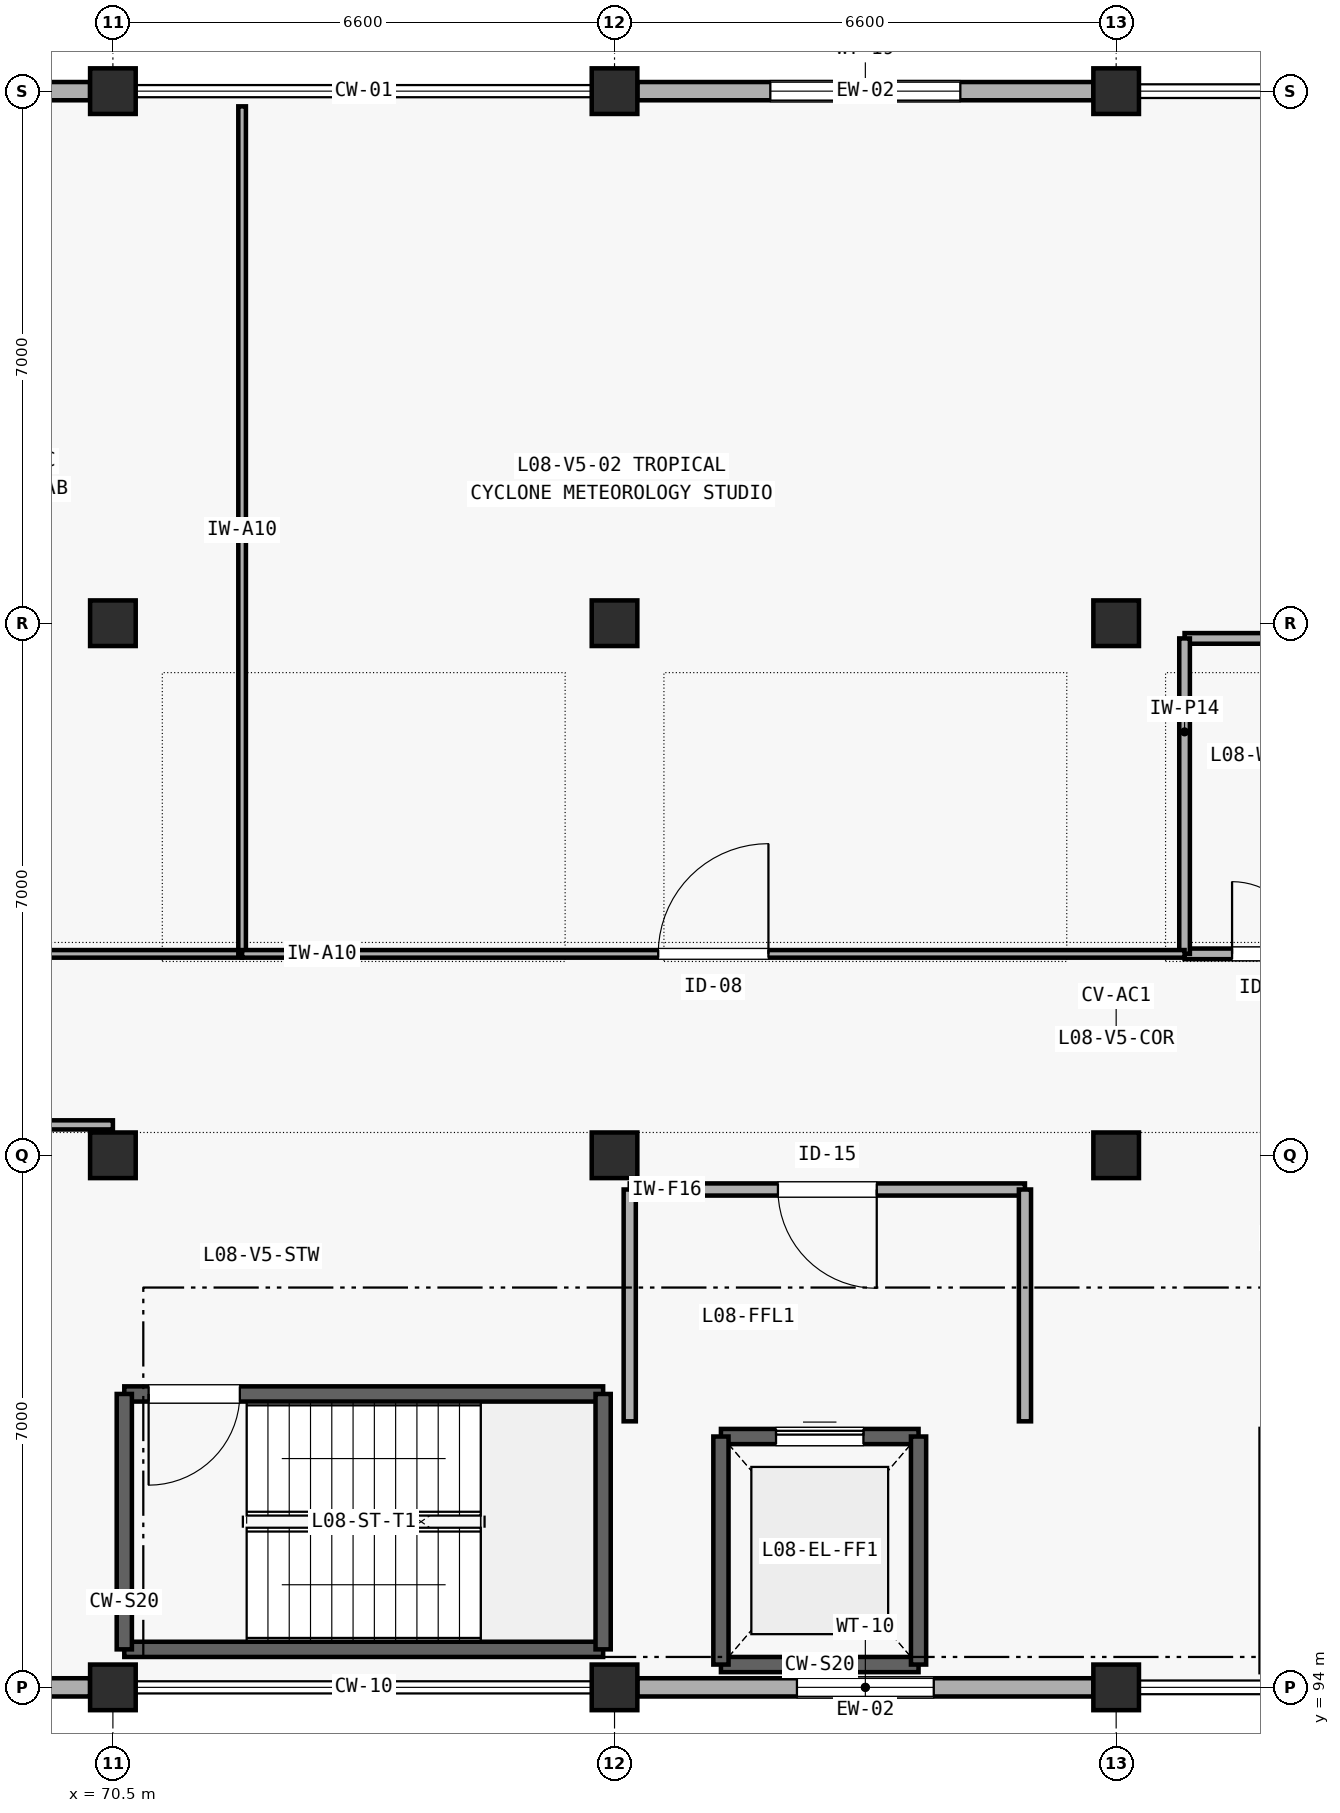
"""IFC4 building model, lengths in metres.
Left out: names, types, materials, properties, quantities, classifications, styles, units other than length and angle.
Written with IfcOpenShell. Run it as: python <this file> out.ifc"""

import sys

from ifc_helpers import new_model, si_unit, direction, frame, frame_2d, origin, origin_2d, place, context, subcontext, project, spatial, rectangle, extrude, element, fill, save


model = new_model("IFC4")
c1 = context("Model", 3, precision=1e-05, world=origin(), true_north=direction((0.0, 1.0)))
c2 = subcontext(c1, "Body", "Model", "MODEL_VIEW")
j1 = project(units=[si_unit("LENGTHUNIT", "METRE"), si_unit("PLANEANGLEUNIT", "RADIAN")], contexts=[c1])
p1 = place(None, origin())
s1 = spatial("IfcSite", under=j1, at=p1, CompositionType="ELEMENT")
p2 = place(p1, origin())
s2 = spatial("IfcBuilding", under=s1, at=p2, CompositionType="ELEMENT")
p3 = place(p2, frame((0.0, 0.0, 33.6)))
s3 = spatial("IfcBuildingStorey", under=s2, at=p3, CompositionType="ELEMENT", Elevation=33.6)
for number, where, z_axis, x_axis in (
    (1, (70.5, 94.0, 0.0), (0.0, 0.0, 1.0), (1.0, 0.0, 0.0)),
    (2, (70.5, 101.0, 0.0), (0.0, 0.0, 1.0), (1.0, 0.0, 0.0)),
    (3, (70.5, 108.0, 0.0), (0.0, 0.0, 1.0), (1.0, 0.0, 0.0)),
    (4, (70.5, 115.0, 0.0), (0.0, 0.0, 1.0), (1.0, 0.0, 0.0)),
    (5, (77.1, 94.0, 0.0), (0.0, 0.0, 1.0), (1.0, 0.0, 0.0)),
    (6, (77.1, 101.0, 0.0), (0.0, 0.0, 1.0), (1.0, 0.0, 0.0)),
    (7, (77.1, 108.0, 0.0), (0.0, 0.0, 1.0), (1.0, 0.0, 0.0)),
    (8, (77.1, 115.0, 0.0), (0.0, 0.0, 1.0), (1.0, 0.0, 0.0)),
    (9, (83.7, 94.0, 0.0), (0.0, 0.0, 1.0), (1.0, 0.0, 0.0)),
    (10, (83.7, 101.0, 0.0), (0.0, 0.0, 1.0), (1.0, 0.0, 0.0)),
    (11, (83.7, 108.0, 0.0), (0.0, 0.0, 1.0), (1.0, 0.0, 0.0)),
    (12, (83.7, 115.0, 0.0), (0.0, 0.0, 1.0), (1.0, 0.0, 0.0)),
):
    element("IfcColumn", number, at=place(p3, frame(where, z_axis=z_axis, x_axis=x_axis)), inside=s3, PredefinedType="COLUMN", context=c2, shape_type="SweptSolid", body=[
        extrude(rectangle(XDim=0.6, YDim=0.6, at=origin_2d()), origin(), (0.0, 0.0, 1.0), 4.2),
    ])
p4 = place(p3, frame((64.2, 94.0, 0.0), z_axis=(0.0, 0.0, 1.0), x_axis=(1.0, 0.0, 0.0)))
e13 = element("IfcWall", 13, at=p4, inside=s3, PredefinedType="SOLIDWALL", context=c2, shape_type="SweptSolid", body=[
    extrude(rectangle(XDim=6.0, YDim=0.24, at=frame_2d((3.0, 0.0))), origin(), (0.0, 0.0, 1.0), 3.235),
])
p5 = place(p4, frame((1.8, 0.0, 0.85)))
e14 = element("IfcOpeningElement", 14, at=p5, cuts=e13, PredefinedType="OPENING", context=c2, shape_type="SweptSolid", body=[
    extrude(rectangle(XDim=2.4, YDim=1.35, at=frame_2d((1.2, 0.675))), frame((0.0, 0.13, 0.0), z_axis=(0.0, -1.0, 0.0), x_axis=(1.0, 0.0, 0.0)), (0.0, 0.0, 1.0), 0.26),
])
p6 = place(p3, frame((77.4, 94.0, 0.0), z_axis=(0.0, 0.0, 1.0), x_axis=(1.0, 0.0, 0.0)))
e15 = element("IfcWall", 15, at=p6, inside=s3, PredefinedType="SOLIDWALL", context=c2, shape_type="SweptSolid", body=[
    extrude(rectangle(XDim=6.0, YDim=0.24, at=frame_2d((3.0, 0.0))), origin(), (0.0, 0.0, 1.0), 3.285),
])
p7 = place(p6, frame((2.1, 0.0, 0.85)))
e16 = element("IfcOpeningElement", 16, at=p7, cuts=e15, PredefinedType="OPENING", context=c2, shape_type="SweptSolid", body=[
    extrude(rectangle(XDim=1.8, YDim=1.5, at=frame_2d((0.9, 0.75))), frame((0.0, 0.13, 0.0), z_axis=(0.0, -1.0, 0.0), x_axis=(1.0, 0.0, 0.0)), (0.0, 0.0, 1.0), 0.26),
])
p8 = place(p3, frame((64.2, 115.0, 0.0), z_axis=(0.0, 0.0, 1.0), x_axis=(1.0, 0.0, 0.0)))
e17 = element("IfcWall", 17, at=p8, inside=s3, PredefinedType="SOLIDWALL", context=c2, shape_type="SweptSolid", body=[
    extrude(rectangle(XDim=6.0, YDim=0.24, at=frame_2d((3.0, 0.0))), origin(), (0.0, 0.0, 1.0), 3.235),
])
p9 = place(p8, frame((2.2, 0.0, 0.85)))
e18 = element("IfcOpeningElement", 18, at=p9, cuts=e17, PredefinedType="OPENING", context=c2, shape_type="SweptSolid", body=[
    extrude(rectangle(XDim=1.6, YDim=1.25, at=frame_2d((0.8, 0.625))), frame((0.0, 0.13, 0.0), z_axis=(0.0, -1.0, 0.0), x_axis=(1.0, 0.0, 0.0)), (0.0, 0.0, 1.0), 0.26),
])
p10 = place(p3, frame((77.4, 115.0, 0.0), z_axis=(0.0, 0.0, 1.0), x_axis=(1.0, 0.0, 0.0)))
e19 = element("IfcWall", 19, at=p10, inside=s3, PredefinedType="SOLIDWALL", context=c2, shape_type="SweptSolid", body=[
    extrude(rectangle(XDim=6.0, YDim=0.24, at=frame_2d((3.0, 0.0))), origin(), (0.0, 0.0, 1.0), 3.285),
])
p11 = place(p10, frame((1.75, 0.0, 0.85)))
e20 = element("IfcOpeningElement", 20, at=p11, cuts=e19, PredefinedType="OPENING", context=c2, shape_type="SweptSolid", body=[
    extrude(rectangle(XDim=2.5, YDim=1.25, at=frame_2d((1.25, 0.625))), frame((0.0, 0.13, 0.0), z_axis=(0.0, -1.0, 0.0), x_axis=(1.0, 0.0, 0.0)), (0.0, 0.0, 1.0), 0.26),
])
p12 = place(p3, frame((70.65, 94.5, 0.0), z_axis=(0.0, 0.0, 1.0), x_axis=(1.0, 0.0, 0.0)))
e21 = element("IfcWall", 21, at=p12, inside=s3, PredefinedType="SHEAR", context=c2, shape_type="SweptSolid", body=[
    extrude(rectangle(XDim=6.3, YDim=0.2, at=frame_2d((3.15, 0.0))), origin(), (0.0, 0.0, 1.0), 4.2),
])
p13 = place(p3, frame((70.65, 97.86, 0.0), z_axis=(0.0, 0.0, 1.0), x_axis=(1.0, 0.0, 0.0)))
e22 = element("IfcWall", 22, at=p13, inside=s3, PredefinedType="SHEAR", context=c2, shape_type="SweptSolid", body=[
    extrude(rectangle(XDim=6.3, YDim=0.2, at=frame_2d((3.15, 0.0))), origin(), (0.0, 0.0, 1.0), 4.2),
])
p14 = place(p13, frame((0.32, 0.0, 0.0)))
e23 = element("IfcOpeningElement", 23, at=p14, cuts=e22, PredefinedType="OPENING", context=c2, shape_type="SweptSolid", body=[
    extrude(rectangle(XDim=1.2, YDim=2.15, at=frame_2d((0.6, 1.075))), frame((0.0, 0.11, 0.0), z_axis=(0.0, -1.0, 0.0), x_axis=(1.0, 0.0, 0.0)), (0.0, 0.0, 1.0), 0.22),
])
for number, where, z_axis, x_axis in (
    (24, (70.65, 94.5, 0.0), (0.0, 0.0, 1.0), (0.0, 1.0, 0.0)),
    (25, (76.95, 94.5, 0.0), (0.0, 0.0, 1.0), (0.0, 1.0, 0.0)),
):
    element("IfcWall", number, at=place(p3, frame(where, z_axis=z_axis, x_axis=x_axis)), inside=s3, PredefinedType="SHEAR", context=c2, shape_type="SweptSolid", body=[
        extrude(rectangle(XDim=3.36, YDim=0.2, at=frame_2d((1.68, 0.0))), origin(), (0.0, 0.0, 1.0), 4.2),
    ])
p15 = place(p3, frame((78.5, 94.3, 0.0), z_axis=(0.0, 0.0, 1.0), x_axis=(1.0, 0.0, 0.0)))
e26 = element("IfcWall", 26, at=p15, inside=s3, PredefinedType="SHEAR", context=c2, shape_type="SweptSolid", body=[
    extrude(rectangle(XDim=2.6, YDim=0.2, at=frame_2d((1.3, 0.0))), origin(), (0.0, 0.0, 1.0), 4.2),
])
p16 = place(p3, frame((78.5, 97.3, 0.0), z_axis=(0.0, 0.0, 1.0), x_axis=(1.0, 0.0, 0.0)))
e27 = element("IfcWall", 27, at=p16, inside=s3, PredefinedType="SHEAR", context=c2, shape_type="SweptSolid", body=[
    extrude(rectangle(XDim=2.6, YDim=0.2, at=frame_2d((1.3, 0.0))), origin(), (0.0, 0.0, 1.0), 4.2),
])
p17 = place(p16, frame((0.725, 0.0, 0.0)))
e28 = element("IfcOpeningElement", 28, at=p17, cuts=e27, PredefinedType="OPENING", context=c2, shape_type="SweptSolid", body=[
    extrude(rectangle(XDim=1.15, YDim=2.2, at=frame_2d((0.575, 1.1))), frame((0.0, 0.11, 0.0), z_axis=(0.0, -1.0, 0.0), x_axis=(1.0, 0.0, 0.0)), (0.0, 0.0, 1.0), 0.22),
])
for number, where, z_axis, x_axis in (
    (29, (78.5, 94.3, 0.0), (0.0, 0.0, 1.0), (0.0, 1.0, 0.0)),
    (30, (81.1, 94.3, 0.0), (0.0, 0.0, 1.0), (0.0, 1.0, 0.0)),
):
    element("IfcWall", number, at=place(p3, frame(where, z_axis=z_axis, x_axis=x_axis)), inside=s3, PredefinedType="SHEAR", context=c2, shape_type="SweptSolid", body=[
        extrude(rectangle(XDim=3.0, YDim=0.2, at=frame_2d((1.5, 0.0))), origin(), (0.0, 0.0, 1.0), 4.2),
    ])
p18 = place(p3, frame((85.7, 94.2, 0.0), z_axis=(0.0, 0.0, 1.0), x_axis=(0.0, 1.0, 0.0)))
e31 = element("IfcWall", 31, at=p18, inside=s3, PredefinedType="SHEAR", context=c2, shape_type="SweptSolid", body=[
    extrude(rectangle(XDim=3.2, YDim=0.2, at=frame_2d((1.6, 0.0))), origin(), (0.0, 0.0, 1.0), 4.2),
])
p19 = place(p3, frame((77.3, 100.55, 0.0), z_axis=(0.0, 0.0, 1.0), x_axis=(1.0, 0.0, 0.0)))
e32 = element("IfcWall", 32, at=p19, inside=s3, PredefinedType="SOLIDWALL", context=c2, shape_type="SweptSolid", body=[
    extrude(rectangle(XDim=5.2, YDim=0.16, at=frame_2d((2.6, 0.0))), origin(), (0.0, 0.0, 1.0), 3.9),
])
p20 = place(p19, frame((1.95, 0.0, 0.0)))
e33 = element("IfcOpeningElement", 33, at=p20, cuts=e32, PredefinedType="OPENING", context=c2, shape_type="SweptSolid", body=[
    extrude(rectangle(XDim=1.3, YDim=2.15, at=frame_2d((0.65, 1.075))), frame((0.0, 0.09, 0.0), z_axis=(0.0, -1.0, 0.0), x_axis=(1.0, 0.0, 0.0)), (0.0, 0.0, 1.0), 0.18),
])
p21 = place(p3, frame((77.3, 97.5, 0.0), z_axis=(0.0, 0.0, 1.0), x_axis=(0.0, 1.0, 0.0)))
e34 = element("IfcWall", 34, at=p21, inside=s3, PredefinedType="SOLIDWALL", context=c2, shape_type="SweptSolid", body=[
    extrude(rectangle(XDim=3.05, YDim=0.16, at=frame_2d((1.525, 0.0))), origin(), (0.0, 0.0, 1.0), 3.405),
])
p22 = place(p3, frame((82.5, 97.5, 0.0), z_axis=(0.0, 0.0, 1.0), x_axis=(0.0, 1.0, 0.0)))
e35 = element("IfcWall", 35, at=p22, inside=s3, PredefinedType="SOLIDWALL", context=c2, shape_type="SweptSolid", body=[
    extrude(rectangle(XDim=3.05, YDim=0.16, at=frame_2d((1.525, 0.0))), origin(), (0.0, 0.0, 1.0), 3.9),
])
p23 = place(p3, frame((84.6, 103.65, 0.0), z_axis=(0.0, 0.0, 1.0), x_axis=(1.0, 0.0, 0.0)))
e36 = element("IfcWall", 36, at=p23, inside=s3, PredefinedType="PLUMBINGWALL", context=c2, shape_type="SweptSolid", body=[
    extrude(rectangle(XDim=2.2, YDim=0.14, at=frame_2d((1.1, 0.0))), origin(), (0.0, 0.0, 1.0), 3.9),
])
p24 = place(p23, frame((0.625, 0.0, 0.0)))
e37 = element("IfcOpeningElement", 37, at=p24, cuts=e36, PredefinedType="OPENING", context=c2, shape_type="SweptSolid", body=[
    extrude(rectangle(XDim=0.95, YDim=2.1, at=frame_2d((0.475, 1.05))), frame((0.0, 0.08, 0.0), z_axis=(0.0, -1.0, 0.0), x_axis=(1.0, 0.0, 0.0)), (0.0, 0.0, 1.0), 0.16),
])
p25 = place(p3, frame((84.6, 107.8, 0.0), z_axis=(0.0, 0.0, 1.0), x_axis=(1.0, 0.0, 0.0)))
e38 = element("IfcWall", 38, at=p25, inside=s3, PredefinedType="PLUMBINGWALL", context=c2, shape_type="SweptSolid", body=[
    extrude(rectangle(XDim=2.2, YDim=0.14, at=frame_2d((1.1, 0.0))), origin(), (0.0, 0.0, 1.0), 3.365),
])
p26 = place(p3, frame((84.6, 103.65, 0.0), z_axis=(0.0, 0.0, 1.0), x_axis=(0.0, 1.0, 0.0)))
e39 = element("IfcWall", 39, at=p26, inside=s3, PredefinedType="PLUMBINGWALL", context=c2, shape_type="SweptSolid", body=[
    extrude(rectangle(XDim=4.15, YDim=0.14, at=frame_2d((2.075, 0.0))), origin(), (0.0, 0.0, 1.0), 3.9),
])
p27 = place(p3, frame((64.1, 103.65, 0.0), z_axis=(0.0, 0.0, 1.0), x_axis=(1.0, 0.0, 0.0)))
e40 = element("IfcWall", 40, at=p27, inside=s3, PredefinedType="PARTITIONING", context=c2, shape_type="SweptSolid", body=[
    extrude(rectangle(XDim=8.1, YDim=0.1, at=frame_2d((4.05, 0.0))), origin(), (0.0, 0.0, 1.0), 3.9),
])
p28 = place(p27, frame((3.375, 0.0, 0.0)))
e41 = element("IfcOpeningElement", 41, at=p28, cuts=e40, PredefinedType="OPENING", context=c2, shape_type="SweptSolid", body=[
    extrude(rectangle(XDim=1.35, YDim=2.2, at=frame_2d((0.675, 1.1))), frame((0.0, 0.06, 0.0), z_axis=(0.0, -1.0, 0.0), x_axis=(1.0, 0.0, 0.0)), (0.0, 0.0, 1.0), 0.12),
])
p29 = place(p3, frame((72.2, 103.65, 0.0), z_axis=(0.0, 0.0, 1.0), x_axis=(0.0, 1.0, 0.0)))
e42 = element("IfcWall", 42, at=p29, inside=s3, PredefinedType="PARTITIONING", context=c2, shape_type="SweptSolid", body=[
    extrude(rectangle(XDim=11.15, YDim=0.1, at=frame_2d((5.575, 0.0))), origin(), (0.0, 0.0, 1.0), 3.9),
])
p30 = place(p3, frame((72.2, 103.65, 0.0), z_axis=(0.0, 0.0, 1.0), x_axis=(1.0, 0.0, 0.0)))
e43 = element("IfcWall", 43, at=p30, inside=s3, PredefinedType="PARTITIONING", context=c2, shape_type="SweptSolid", body=[
    extrude(rectangle(XDim=12.4, YDim=0.1, at=frame_2d((6.2, 0.0))), origin(), (0.0, 0.0, 1.0), 3.9),
])
p31 = place(p30, frame((5.475, 0.0, 0.0)))
e44 = element("IfcOpeningElement", 44, at=p31, cuts=e43, PredefinedType="OPENING", context=c2, shape_type="SweptSolid", body=[
    extrude(rectangle(XDim=1.45, YDim=2.2, at=frame_2d((0.725, 1.1))), frame((0.0, 0.06, 0.0), z_axis=(0.0, -1.0, 0.0), x_axis=(1.0, 0.0, 0.0)), (0.0, 0.0, 1.0), 0.12),
])
p32 = place(p3, frame((64.1, 101.4, 0.0), z_axis=(0.0, 0.0, 1.0), x_axis=(1.0, 0.0, 0.0)))
e45 = element("IfcWall", 45, at=p32, inside=s3, PredefinedType="PARTITIONING", context=c2, shape_type="SweptSolid", body=[
    extrude(rectangle(XDim=6.4, YDim=0.12, at=frame_2d((3.2, 0.0))), origin(), (0.0, 0.0, 1.0), 3.9),
])
p33 = place(p32, frame((2.325, 0.0, 0.0)))
e46 = element("IfcOpeningElement", 46, at=p33, cuts=e45, PredefinedType="OPENING", context=c2, shape_type="SweptSolid", body=[
    extrude(rectangle(XDim=1.75, YDim=2.25, at=frame_2d((0.875, 1.125))), frame((0.0, 0.07, 0.0), z_axis=(0.0, -1.0, 0.0), x_axis=(1.0, 0.0, 0.0)), (0.0, 0.0, 1.0), 0.14),
])
p34 = place(p7, origin())
e47 = element("IfcWindow", 47, at=p34, inside=s3, PartitioningType="SINGLE_PANEL", PredefinedType="WINDOW", context=c2, shape_type="SweptSolid", body=[
    extrude(rectangle(XDim=1.8, YDim=1.5, at=frame_2d((0.9, 0.75))), frame((0.0, 0.03, 0.0), z_axis=(0.0, -1.0, 0.0), x_axis=(1.0, 0.0, 0.0)), (0.0, 0.0, 1.0), 0.06),
])
fill(e16, e47)
p35 = place(p11, origin())
e48 = element("IfcWindow", 48, at=p35, inside=s3, PartitioningType="SINGLE_PANEL", PredefinedType="WINDOW", context=c2, shape_type="SweptSolid", body=[
    extrude(rectangle(XDim=2.5, YDim=1.25, at=frame_2d((1.25, 0.625))), frame((0.0, 0.03, 0.0), z_axis=(0.0, -1.0, 0.0), x_axis=(1.0, 0.0, 0.0)), (0.0, 0.0, 1.0), 0.06),
])
fill(e20, e48)
p36 = place(p14, frame((1.2, 0.0, 0.0), z_axis=(0.0, 0.0, 1.0), x_axis=(-1.0, 0.0, 0.0)))
e49 = element("IfcDoor", 49, at=p36, inside=s3, OperationType="SINGLE_SWING_RIGHT", PredefinedType="DOOR", context=c2, shape_type="SweptSolid", body=[
    extrude(rectangle(XDim=1.2, YDim=2.15, at=frame_2d((0.6, 1.075))), frame((0.0, 0.025, 0.0), z_axis=(0.0, -1.0, 0.0), x_axis=(1.0, 0.0, 0.0)), (0.0, 0.0, 1.0), 0.05),
])
fill(e23, e49)
p37 = place(p17, origin())
e50 = element("IfcDoor", 50, at=p37, inside=s3, OperationType="SLIDING_TO_LEFT", PredefinedType="DOOR", context=c2, shape_type="SweptSolid", body=[
    extrude(rectangle(XDim=1.15, YDim=2.2, at=frame_2d((0.575, 1.1))), frame((0.0, 0.025, 0.0), z_axis=(0.0, -1.0, 0.0), x_axis=(1.0, 0.0, 0.0)), (0.0, 0.0, 1.0), 0.05),
])
fill(e28, e50)
p38 = place(p20, frame((1.3, 0.0, 0.0), z_axis=(0.0, 0.0, 1.0), x_axis=(-1.0, 0.0, 0.0)))
e51 = element("IfcDoor", 51, at=p38, inside=s3, OperationType="SINGLE_SWING_LEFT", PredefinedType="DOOR", context=c2, shape_type="SweptSolid", body=[
    extrude(rectangle(XDim=1.3, YDim=2.15, at=frame_2d((0.65, 1.075))), frame((0.0, 0.025, 0.0), z_axis=(0.0, -1.0, 0.0), x_axis=(1.0, 0.0, 0.0)), (0.0, 0.0, 1.0), 0.05),
])
fill(e33, e51)
p39 = place(p24, origin())
e52 = element("IfcDoor", 52, at=p39, inside=s3, OperationType="SINGLE_SWING_LEFT", PredefinedType="DOOR", context=c2, shape_type="SweptSolid", body=[
    extrude(rectangle(XDim=0.95, YDim=2.1, at=frame_2d((0.475, 1.05))), frame((0.0, 0.025, 0.0), z_axis=(0.0, -1.0, 0.0), x_axis=(1.0, 0.0, 0.0)), (0.0, 0.0, 1.0), 0.05),
])
fill(e37, e52)
p40 = place(p31, origin())
e53 = element("IfcDoor", 53, at=p40, inside=s3, OperationType="SINGLE_SWING_RIGHT", PredefinedType="DOOR", context=c2, shape_type="SweptSolid", body=[
    extrude(rectangle(XDim=1.45, YDim=2.2, at=frame_2d((0.725, 1.1))), frame((0.0, 0.025, 0.0), z_axis=(0.0, -1.0, 0.0), x_axis=(1.0, 0.0, 0.0)), (0.0, 0.0, 1.0), 0.05),
])
fill(e44, e53)
save(model, sys.argv[1])
